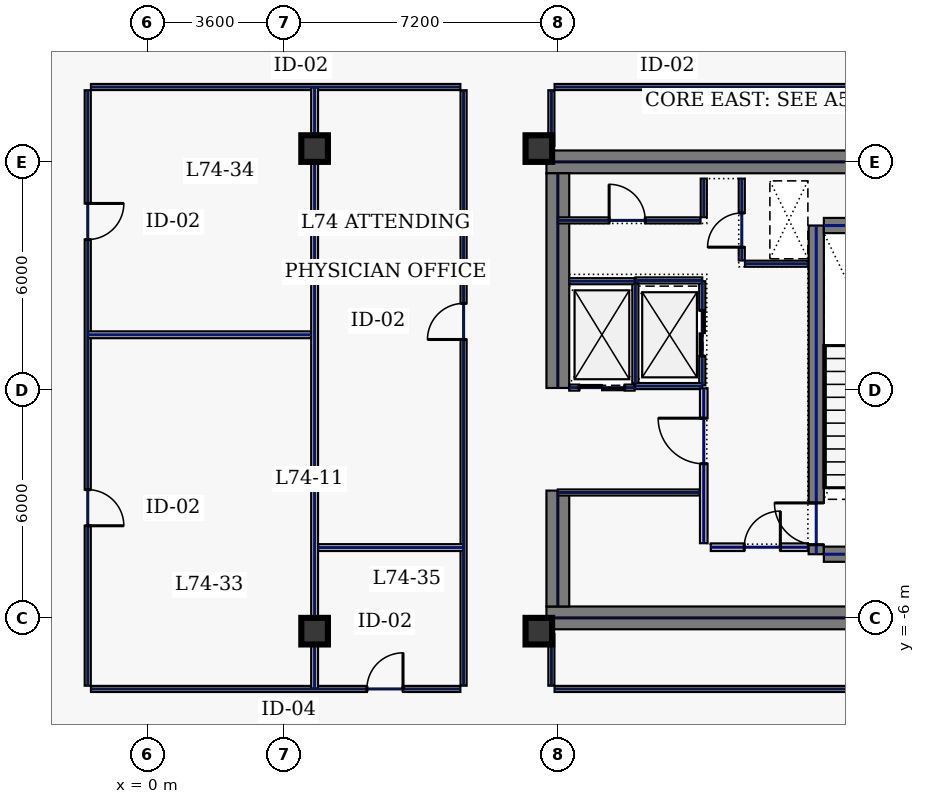
"""IFC4 building model, lengths in metres.
Left out: names, types, materials, properties, quantities, classifications, styles, units other than length and angle.
Written with IfcOpenShell. Run it as: python <this file> out.ifc"""

import sys

from ifc_helpers import new_model, si_unit, direction, frame, frame_2d, origin, origin_2d, place, context, subcontext, project, spatial, rectangle, hollow_rectangle, extrude, element, fill, save


model = new_model("IFC4")
c1 = context("Model", 3, precision=1e-05, world=origin(), true_north=direction((0.0, 1.0)))
c2 = subcontext(c1, "Body", "Model", "MODEL_VIEW")
j1 = project(units=[si_unit("LENGTHUNIT", "METRE"), si_unit("PLANEANGLEUNIT", "RADIAN")], contexts=[c1])
p1 = place(None, origin())
s1 = spatial("IfcSite", under=j1, at=p1, CompositionType="ELEMENT")
p2 = place(p1, origin())
s2 = spatial("IfcBuilding", under=s1, at=p2, CompositionType="ELEMENT")
p3 = place(p2, frame((0.0, 0.0, 317.0)))
s3 = spatial("IfcBuildingStorey", under=s2, at=p3, CompositionType="ELEMENT", Elevation=317.0)
for number, where, z_axis, x_axis in (
    (1, (10.5, 6.0, 0.0), (0.0, 0.0, 1.0), (1.0, 0.0, 0.0)),
    (2, (10.5, -6.0, 0.0), (0.0, 0.0, 1.0), (1.0, 0.0, 0.0)),
):
    element("IfcWall", number, at=place(p3, frame(where, z_axis=z_axis, x_axis=x_axis)), inside=s3, PredefinedType="SHEAR", context=c2, shape_type="SweptSolid", body=[
        extrude(rectangle(XDim=11.5, YDim=0.6, at=frame_2d((5.75, 0.0))), origin(), (0.0, 0.0, 1.0), 3.74),
    ])
p4 = place(p3, frame((10.8, -5.7, 0.0), z_axis=(0.0, 0.0, 1.0), x_axis=(0.0, 1.0, 0.0)))
e3 = element("IfcWall", 3, at=p4, inside=s3, PredefinedType="SHEAR", context=c2, shape_type="SweptSolid", body=[
    extrude(rectangle(XDim=3.05, YDim=0.6, at=frame_2d((1.525, 0.0))), origin(), (0.0, 0.0, 1.0), 3.74),
])
p5 = place(p3, frame((10.8, 0.05, 0.0), z_axis=(0.0, 0.0, 1.0), x_axis=(0.0, 1.0, 0.0)))
e4 = element("IfcWall", 4, at=p5, inside=s3, PredefinedType="SHEAR", context=c2, shape_type="SweptSolid", body=[
    extrude(rectangle(XDim=5.65, YDim=0.6, at=frame_2d((2.825, 0.0))), origin(), (0.0, 0.0, 1.0), 3.74),
])
p6 = place(p3, frame((17.6, -4.325, 0.0), z_axis=(0.0, 0.0, 1.0), x_axis=(0.0, 1.0, 0.0)))
e5 = element("IfcWall", 5, at=p6, inside=s3, PredefinedType="SHEAR", context=c2, shape_type="SweptSolid", body=[
    extrude(rectangle(XDim=8.65, YDim=0.4, at=frame_2d((4.325, 0.0))), origin(), (0.0, 0.0, 1.0), 3.74),
])
p7 = place(p6, frame((0.25, 0.0, 0.0)))
e6 = element("IfcOpeningElement", 6, at=p7, cuts=e5, PredefinedType="OPENING", context=c2, shape_type="SweptSolid", body=[
    extrude(rectangle(XDim=1.1, YDim=2.2, at=frame_2d((0.55, 1.1))), frame((0.0, 0.21, 0.0), z_axis=(0.0, -1.0, 0.0), x_axis=(1.0, 0.0, 0.0)), (0.0, 0.0, 1.0), 0.42),
])
for number, where, z_axis, x_axis in (
    (7, (17.8, -4.325, 0.0), (0.0, 0.0, 1.0), (1.0, 0.0, 0.0)),
    (8, (17.8, 4.325, 0.0), (0.0, 0.0, 1.0), (1.0, 0.0, 0.0)),
):
    element("IfcWall", number, at=place(p3, frame(where, z_axis=z_axis, x_axis=x_axis)), inside=s3, PredefinedType="SHEAR", context=c2, shape_type="SweptSolid", body=[
        extrude(rectangle(XDim=3.4, YDim=0.4, at=frame_2d((1.7, 0.0))), origin(), (0.0, 0.0, 1.0), 3.74),
    ])
for number, where, z_axis, x_axis in (
    (9, (10.3, -6.35, 0.0), (0.0, 0.0, 1.0), (1.0, 0.0, 0.0)),
    (10, (10.3, 6.35, 0.0), (0.0, 0.0, 1.0), (1.0, 0.0, 0.0)),
    (11, (4.4, -6.35, 0.0), (0.0, 0.0, 1.0), (1.0, 0.0, 0.0)),
    (12, (4.4, 6.35, 0.0), (0.0, 0.0, 1.0), (1.0, 0.0, 0.0)),
):
    element("IfcColumn", number, at=place(p3, frame(where, z_axis=z_axis, x_axis=x_axis)), inside=s3, PredefinedType="COLUMN", context=c2, shape_type="SweptSolid", body=[
        extrude(hollow_rectangle(XDim=0.7, YDim=0.7, WallThickness=0.032, at=origin_2d()), origin(), (0.0, 0.0, 1.0), 3.74),
    ])
p8 = place(p3, frame((14.6, 0.12, 0.0), z_axis=(0.0, 0.0, 1.0), x_axis=(0.0, 1.0, 0.0)))
e13 = element("IfcWall", 13, at=p8, inside=s3, PredefinedType="PARTITIONING", context=c2, shape_type="SweptSolid", body=[
    extrude(rectangle(XDim=2.74, YDim=0.16, at=frame_2d((1.37, 0.0))), origin(), (0.0, 0.0, 1.0), 3.74),
])
p9 = place(p8, frame((0.77, 0.0, 0.0)))
e14 = element("IfcOpeningElement", 14, at=p9, cuts=e13, PredefinedType="OPENING", context=c2, shape_type="SweptSolid", body=[
    extrude(rectangle(XDim=1.2, YDim=2.2, at=frame_2d((0.6, 1.1))), frame((0.0, 0.09, 0.0), z_axis=(0.0, -1.0, 0.0), x_axis=(1.0, 0.0, 0.0)), (0.0, 0.0, 1.0), 0.18),
])
for number, where, z_axis, x_axis in (
    (15, (12.84, 0.1, 0.0), (0.0, 0.0, 1.0), (1.0, 0.0, 0.0)),
    (16, (12.84, 2.88, 0.0), (0.0, 0.0, 1.0), (1.0, 0.0, 0.0)),
):
    element("IfcWall", number, at=place(p3, frame(where, z_axis=z_axis, x_axis=x_axis)), inside=s3, PredefinedType="PARTITIONING", context=c2, shape_type="SweptSolid", body=[
        extrude(rectangle(XDim=1.76, YDim=0.16, at=frame_2d((0.88, 0.0))), origin(), (0.0, 0.0, 1.0), 3.74),
    ])
p10 = place(p3, frame((12.84, 0.18, 0.0), z_axis=(0.0, 0.0, 1.0), x_axis=(0.0, 1.0, 0.0)))
e17 = element("IfcWall", 17, at=p10, inside=s3, PredefinedType="PARTITIONING", context=c2, shape_type="SweptSolid", body=[
    extrude(rectangle(XDim=2.62, YDim=0.16, at=frame_2d((1.31, 0.0))), origin(), (0.0, 0.0, 1.0), 3.74),
])
p11 = place(p3, frame((11.1, 0.06, 0.0), z_axis=(0.0, 0.0, 1.0), x_axis=(1.0, 0.0, 0.0)))
e18 = element("IfcWall", 18, at=p11, inside=s3, PredefinedType="PARTITIONING", context=c2, shape_type="SweptSolid", body=[
    extrude(rectangle(XDim=1.72, YDim=0.16, at=frame_2d((0.86, 0.0))), origin(), (0.0, 0.0, 1.0), 3.74),
])
p12 = place(p11, frame((0.26, 0.0, 0.0)))
e19 = element("IfcOpeningElement", 19, at=p12, cuts=e18, PredefinedType="OPENING", context=c2, shape_type="SweptSolid", body=[
    extrude(rectangle(XDim=1.2, YDim=2.2, at=frame_2d((0.6, 1.1))), frame((0.0, 0.09, 0.0), z_axis=(0.0, -1.0, 0.0), x_axis=(1.0, 0.0, 0.0)), (0.0, 0.0, 1.0), 0.18),
])
p13 = place(p3, frame((11.1, 2.86, 0.0), z_axis=(0.0, 0.0, 1.0), x_axis=(1.0, 0.0, 0.0)))
e20 = element("IfcWall", 20, at=p13, inside=s3, PredefinedType="PARTITIONING", context=c2, shape_type="SweptSolid", body=[
    extrude(rectangle(XDim=1.72, YDim=0.16, at=frame_2d((0.86, 0.0))), origin(), (0.0, 0.0, 1.0), 3.74),
])
p14 = place(p3, frame((15.64, 3.405, 0.0), z_axis=(0.0, 0.0, 1.0), x_axis=(0.0, 1.0, 0.0)))
e21 = element("IfcWall", 21, at=p14, inside=s3, PredefinedType="PARTITIONING", context=c2, shape_type="SweptSolid", body=[
    extrude(rectangle(XDim=2.155, YDim=0.16, at=frame_2d((1.078, 0.0))), origin(), (0.0, 0.0, 1.0), 3.74),
])
p15 = place(p14, frame((0.35, 0.0, 0.0)))
e22 = element("IfcOpeningElement", 22, at=p15, cuts=e21, PredefinedType="OPENING", context=c2, shape_type="SweptSolid", body=[
    extrude(rectangle(XDim=0.9, YDim=2.2, at=frame_2d((0.45, 1.1))), frame((0.0, 0.09, 0.0), z_axis=(0.0, -1.0, 0.0), x_axis=(1.0, 0.0, 0.0)), (0.0, 0.0, 1.0), 0.18),
])
p16 = place(p3, frame((15.725, 3.32, 0.0), z_axis=(0.0, 0.0, 1.0), x_axis=(1.0, 0.0, 0.0)))
e23 = element("IfcWall", 23, at=p16, inside=s3, PredefinedType="PARTITIONING", context=c2, shape_type="SweptSolid", body=[
    extrude(rectangle(XDim=1.655, YDim=0.16, at=frame_2d((0.827, 0.0))), origin(), (0.0, 0.0, 1.0), 3.74),
])
p17 = place(p3, frame((14.825, -4.14, 0.0), z_axis=(0.0, 0.0, 1.0), x_axis=(1.0, 0.0, 0.0)))
e24 = element("IfcWall", 24, at=p17, inside=s3, PredefinedType="SOLIDWALL", context=c2, shape_type="SweptSolid", body=[
    extrude(rectangle(XDim=2.555, YDim=0.2, at=frame_2d((1.277, 0.0))), origin(), (0.0, 0.0, 1.0), 3.74),
])
p18 = place(p17, frame((0.88, 0.0, 0.0)))
e25 = element("IfcOpeningElement", 25, at=p18, cuts=e24, PredefinedType="OPENING", context=c2, shape_type="SweptSolid", body=[
    extrude(rectangle(XDim=0.95, YDim=2.2, at=frame_2d((0.475, 1.1))), frame((0.0, 0.11, 0.0), z_axis=(0.0, -1.0, 0.0), x_axis=(1.0, 0.0, 0.0)), (0.0, 0.0, 1.0), 0.22),
])
p19 = place(p3, frame((10.8, -2.7, 0.0), z_axis=(0.0, 0.0, 1.0), x_axis=(1.0, 0.0, 0.0)))
e26 = element("IfcWall", 26, at=p19, inside=s3, PredefinedType="PARTITIONING", context=c2, shape_type="SweptSolid", body=[
    extrude(rectangle(XDim=3.735, YDim=0.16, at=frame_2d((1.867, 0.0))), origin(), (0.0, 0.0, 1.0), 3.74),
])
p20 = place(p3, frame((10.8, 4.46, 0.0), z_axis=(0.0, 0.0, 1.0), x_axis=(1.0, 0.0, 0.0)))
e27 = element("IfcWall", 27, at=p20, inside=s3, PredefinedType="PARTITIONING", context=c2, shape_type="SweptSolid", body=[
    extrude(rectangle(XDim=3.755, YDim=0.16, at=frame_2d((1.877, 0.0))), origin(), (0.0, 0.0, 1.0), 3.74),
])
p21 = place(p20, frame((1.35, 0.0, 0.0)))
e28 = element("IfcOpeningElement", 28, at=p21, cuts=e27, PredefinedType="OPENING", context=c2, shape_type="SweptSolid", body=[
    extrude(rectangle(XDim=0.95, YDim=2.2, at=frame_2d((0.475, 1.1))), frame((0.0, 0.09, 0.0), z_axis=(0.0, -1.0, 0.0), x_axis=(1.0, 0.0, 0.0)), (0.0, 0.0, 1.0), 0.18),
])
p22 = place(p3, frame((14.64, 4.545, 0.0), z_axis=(0.0, 0.0, 1.0), x_axis=(0.0, 1.0, 0.0)))
e29 = element("IfcWall", 29, at=p22, inside=s3, PredefinedType="PARTITIONING", context=c2, shape_type="SweptSolid", body=[
    extrude(rectangle(XDim=1.015, YDim=0.16, at=frame_2d((0.508, 0.0))), origin(), (0.0, 0.0, 1.0), 3.74),
])
p23 = place(p3, frame((14.64, -4.035, 0.0), z_axis=(0.0, 0.0, 1.0), x_axis=(0.0, 1.0, 0.0)))
e30 = element("IfcWall", 30, at=p23, inside=s3, PredefinedType="SOLIDWALL", context=c2, shape_type="SweptSolid", body=[
    extrude(rectangle(XDim=4.075, YDim=0.2, at=frame_2d((2.038, 0.0))), origin(), (0.0, 0.0, 1.0), 3.74),
])
p24 = place(p23, frame((2.09, 0.0, 0.0)))
e31 = element("IfcOpeningElement", 31, at=p24, cuts=e30, PredefinedType="OPENING", context=c2, shape_type="SweptSolid", body=[
    extrude(rectangle(XDim=1.2, YDim=2.2, at=frame_2d((0.6, 1.1))), frame((0.0, 0.11, 0.0), z_axis=(0.0, -1.0, 0.0), x_axis=(1.0, 0.0, 0.0)), (0.0, 0.0, 1.0), 0.22),
])
p25 = place(p3, frame((21.915, 7.97, 0.0), z_axis=(0.0, 0.0, 1.0), x_axis=(-1.0, 0.0, 0.0)))
e32 = element("IfcWall", 32, at=p25, inside=s3, PredefinedType="PARTITIONING", context=c2, shape_type="SweptSolid", body=[
    extrude(rectangle(XDim=11.2, YDim=0.16, at=frame_2d((5.6, 0.0))), origin(), (0.0, 0.0, 1.0), 3.74),
])
p26 = place(p3, frame((10.63, 7.885, 0.0), z_axis=(0.0, 0.0, 1.0), x_axis=(0.0, -1.0, 0.0)))
e33 = element("IfcWall", 33, at=p26, inside=s3, PredefinedType="PARTITIONING", context=c2, shape_type="SweptSolid", body=[
    extrude(rectangle(XDim=1.465, YDim=0.16, at=frame_2d((0.732, 0.0))), origin(), (0.0, 0.0, 1.0), 3.74),
])
p27 = place(p3, frame((10.63, -6.42, 0.0), z_axis=(0.0, 0.0, 1.0), x_axis=(0.0, -1.0, 0.0)))
e34 = element("IfcWall", 34, at=p27, inside=s3, PredefinedType="PARTITIONING", context=c2, shape_type="SweptSolid", body=[
    extrude(rectangle(XDim=1.365, YDim=0.16, at=frame_2d((0.683, 0.0))), origin(), (0.0, 0.0, 1.0), 3.74),
])
p28 = place(p3, frame((10.715, -7.87, 0.0), z_axis=(0.0, 0.0, 1.0), x_axis=(1.0, 0.0, 0.0)))
e35 = element("IfcWall", 35, at=p28, inside=s3, PredefinedType="PARTITIONING", context=c2, shape_type="SweptSolid", body=[
    extrude(rectangle(XDim=11.2, YDim=0.16, at=frame_2d((5.6, 0.0))), origin(), (0.0, 0.0, 1.0), 3.74),
])
p29 = place(p3, frame((8.235, 7.97, 0.0), z_axis=(0.0, 0.0, 1.0), x_axis=(-1.0, 0.0, 0.0)))
e36 = element("IfcWall", 36, at=p29, inside=s3, PredefinedType="PARTITIONING", context=c2, shape_type="SweptSolid", body=[
    extrude(rectangle(XDim=9.72, YDim=0.16, at=frame_2d((4.86, 0.0))), origin(), (0.0, 0.0, 1.0), 3.74),
])
p30 = place(p3, frame((-1.57, 7.885, 0.0), z_axis=(0.0, 0.0, 1.0), x_axis=(0.0, -1.0, 0.0)))
e37 = element("IfcWall", 37, at=p30, inside=s3, PredefinedType="PARTITIONING", context=c2, shape_type="SweptSolid", body=[
    extrude(rectangle(XDim=15.67, YDim=0.16, at=frame_2d((7.835, 0.0))), origin(), (0.0, 0.0, 1.0), 3.74),
])
p31 = place(p30, frame((10.511, 0.0, 0.0)))
e38 = element("IfcOpeningElement", 38, at=p31, cuts=e37, PredefinedType="OPENING", context=c2, shape_type="SweptSolid", body=[
    extrude(rectangle(XDim=0.95, YDim=2.2, at=frame_2d((0.475, 1.1))), frame((0.0, 0.09, 0.0), z_axis=(0.0, -1.0, 0.0), x_axis=(1.0, 0.0, 0.0)), (0.0, 0.0, 1.0), 0.18),
])
p32 = place(p30, frame((2.979, 0.0, 0.0)))
e39 = element("IfcOpeningElement", 39, at=p32, cuts=e37, PredefinedType="OPENING", context=c2, shape_type="SweptSolid", body=[
    extrude(rectangle(XDim=0.95, YDim=2.2, at=frame_2d((0.475, 1.1))), frame((0.0, 0.09, 0.0), z_axis=(0.0, -1.0, 0.0), x_axis=(1.0, 0.0, 0.0)), (0.0, 0.0, 1.0), 0.18),
])
p33 = place(p3, frame((-1.485, -7.87, 0.0), z_axis=(0.0, 0.0, 1.0), x_axis=(1.0, 0.0, 0.0)))
e40 = element("IfcWall", 40, at=p33, inside=s3, PredefinedType="PARTITIONING", context=c2, shape_type="SweptSolid", body=[
    extrude(rectangle(XDim=9.72, YDim=0.16, at=frame_2d((4.86, 0.0))), origin(), (0.0, 0.0, 1.0), 3.74),
])
p34 = place(p33, frame((7.261, 0.0, 0.0)))
e41 = element("IfcOpeningElement", 41, at=p34, cuts=e40, PredefinedType="OPENING", context=c2, shape_type="SweptSolid", body=[
    extrude(rectangle(XDim=0.95, YDim=2.2, at=frame_2d((0.475, 1.1))), frame((0.0, 0.09, 0.0), z_axis=(0.0, -1.0, 0.0), x_axis=(1.0, 0.0, 0.0)), (0.0, 0.0, 1.0), 0.18),
])
p35 = place(p3, frame((8.32, -7.785, 0.0), z_axis=(0.0, 0.0, 1.0), x_axis=(0.0, 1.0, 0.0)))
e42 = element("IfcWall", 42, at=p35, inside=s3, PredefinedType="PARTITIONING", context=c2, shape_type="SweptSolid", body=[
    extrude(rectangle(XDim=15.67, YDim=0.16, at=frame_2d((7.835, 0.0))), origin(), (0.0, 0.0, 1.0), 3.74),
])
p36 = place(p35, frame((9.111, 0.0, 0.0)))
e43 = element("IfcOpeningElement", 43, at=p36, cuts=e42, PredefinedType="OPENING", context=c2, shape_type="SweptSolid", body=[
    extrude(rectangle(XDim=0.95, YDim=2.2, at=frame_2d((0.475, 1.1))), frame((0.0, 0.09, 0.0), z_axis=(0.0, -1.0, 0.0), x_axis=(1.0, 0.0, 0.0)), (0.0, 0.0, 1.0), 0.18),
])
p37 = place(p3, frame((4.4, -7.865, 0.0), z_axis=(0.0, 0.0, 1.0), x_axis=(0.0, 1.0, 0.0)))
e44 = element("IfcWall", 44, at=p37, inside=s3, PredefinedType="PARTITIONING", context=c2, shape_type="SweptSolid", body=[
    extrude(rectangle(XDim=15.83, YDim=0.18, at=frame_2d((7.915, 0.0))), origin(), (0.0, 0.0, 1.0), 3.035),
])
p38 = place(p3, frame((-1.565, 1.45, 0.0), z_axis=(0.0, 0.0, 1.0), x_axis=(1.0, 0.0, 0.0)))
e45 = element("IfcWall", 45, at=p38, inside=s3, PredefinedType="PARTITIONING", context=c2, shape_type="SweptSolid", body=[
    extrude(rectangle(XDim=5.87, YDim=0.18, at=frame_2d((2.935, 0.0))), origin(), (0.0, 0.0, 1.0), 3.74),
])
p39 = place(p3, frame((4.495, -4.15, 0.0), z_axis=(0.0, 0.0, 1.0), x_axis=(1.0, 0.0, 0.0)))
e46 = element("IfcWall", 46, at=p39, inside=s3, PredefinedType="PARTITIONING", context=c2, shape_type="SweptSolid", body=[
    extrude(rectangle(XDim=3.82, YDim=0.18, at=frame_2d((1.91, 0.0))), origin(), (0.0, 0.0, 1.0), 3.74),
])
p40 = place(p7, origin())
e47 = element("IfcDoor", 47, at=p40, inside=s3, OperationType="SINGLE_SWING_RIGHT", PredefinedType="DOOR", context=c2, shape_type="SweptSolid", body=[
    extrude(rectangle(XDim=1.1, YDim=2.2, at=frame_2d((0.55, 1.1))), frame((0.0, 0.025, 0.0), z_axis=(0.0, -1.0, 0.0), x_axis=(1.0, 0.0, 0.0)), (0.0, 0.0, 1.0), 0.05),
])
fill(e6, e47)
p41 = place(p9, origin())
e48 = element("IfcDoor", 48, at=p41, inside=s3, OperationType="SLIDING_TO_LEFT", PredefinedType="DOOR", context=c2, shape_type="SweptSolid", body=[
    extrude(rectangle(XDim=1.2, YDim=2.2, at=frame_2d((0.6, 1.1))), frame((0.0, 0.025, 0.0), z_axis=(0.0, -1.0, 0.0), x_axis=(1.0, 0.0, 0.0)), (0.0, 0.0, 1.0), 0.05),
])
fill(e14, e48)
p42 = place(p12, origin())
e49 = element("IfcDoor", 49, at=p42, inside=s3, OperationType="SLIDING_TO_LEFT", PredefinedType="DOOR", context=c2, shape_type="SweptSolid", body=[
    extrude(rectangle(XDim=1.2, YDim=2.2, at=frame_2d((0.6, 1.1))), frame((0.0, 0.025, 0.0), z_axis=(0.0, -1.0, 0.0), x_axis=(1.0, 0.0, 0.0)), (0.0, 0.0, 1.0), 0.05),
])
fill(e19, e49)
p43 = place(p15, origin())
e50 = element("IfcDoor", 50, at=p43, inside=s3, OperationType="SINGLE_SWING_LEFT", PredefinedType="DOOR", context=c2, shape_type="SweptSolid", body=[
    extrude(rectangle(XDim=0.9, YDim=2.2, at=frame_2d((0.45, 1.1))), frame((0.0, 0.025, 0.0), z_axis=(0.0, -1.0, 0.0), x_axis=(1.0, 0.0, 0.0)), (0.0, 0.0, 1.0), 0.05),
])
fill(e22, e50)
p44 = place(p18, origin())
e51 = element("IfcDoor", 51, at=p44, inside=s3, OperationType="SINGLE_SWING_RIGHT", PredefinedType="DOOR", context=c2, shape_type="SweptSolid", body=[
    extrude(rectangle(XDim=0.95, YDim=2.2, at=frame_2d((0.475, 1.1))), frame((0.0, 0.025, 0.0), z_axis=(0.0, -1.0, 0.0), x_axis=(1.0, 0.0, 0.0)), (0.0, 0.0, 1.0), 0.05),
])
fill(e25, e51)
p45 = place(p21, origin())
e52 = element("IfcDoor", 52, at=p45, inside=s3, OperationType="SINGLE_SWING_LEFT", PredefinedType="DOOR", context=c2, shape_type="SweptSolid", body=[
    extrude(rectangle(XDim=0.95, YDim=2.2, at=frame_2d((0.475, 1.1))), frame((0.0, 0.025, 0.0), z_axis=(0.0, -1.0, 0.0), x_axis=(1.0, 0.0, 0.0)), (0.0, 0.0, 1.0), 0.05),
])
fill(e28, e52)
p46 = place(p24, origin())
e53 = element("IfcDoor", 53, at=p46, inside=s3, OperationType="SINGLE_SWING_RIGHT", PredefinedType="DOOR", context=c2, shape_type="SweptSolid", body=[
    extrude(rectangle(XDim=1.2, YDim=2.2, at=frame_2d((0.6, 1.1))), frame((0.0, 0.025, 0.0), z_axis=(0.0, -1.0, 0.0), x_axis=(1.0, 0.0, 0.0)), (0.0, 0.0, 1.0), 0.05),
])
fill(e31, e53)
p47 = place(p31, origin())
e54 = element("IfcDoor", 54, at=p47, inside=s3, OperationType="SINGLE_SWING_RIGHT", PredefinedType="DOOR", context=c2, shape_type="SweptSolid", body=[
    extrude(rectangle(XDim=0.95, YDim=2.2, at=frame_2d((0.475, 1.1))), frame((0.0, 0.025, 0.0), z_axis=(0.0, -1.0, 0.0), x_axis=(1.0, 0.0, 0.0)), (0.0, 0.0, 1.0), 0.05),
])
fill(e38, e54)
p48 = place(p32, origin())
e55 = element("IfcDoor", 55, at=p48, inside=s3, OperationType="SINGLE_SWING_LEFT", PredefinedType="DOOR", context=c2, shape_type="SweptSolid", body=[
    extrude(rectangle(XDim=0.95, YDim=2.2, at=frame_2d((0.475, 1.1))), frame((0.0, 0.025, 0.0), z_axis=(0.0, -1.0, 0.0), x_axis=(1.0, 0.0, 0.0)), (0.0, 0.0, 1.0), 0.05),
])
fill(e39, e55)
p49 = place(p34, origin())
e56 = element("IfcDoor", 56, at=p49, inside=s3, OperationType="SINGLE_SWING_RIGHT", PredefinedType="DOOR", context=c2, shape_type="SweptSolid", body=[
    extrude(rectangle(XDim=0.95, YDim=2.2, at=frame_2d((0.475, 1.1))), frame((0.0, 0.025, 0.0), z_axis=(0.0, -1.0, 0.0), x_axis=(1.0, 0.0, 0.0)), (0.0, 0.0, 1.0), 0.05),
])
fill(e41, e56)
p50 = place(p36, origin())
e57 = element("IfcDoor", 57, at=p50, inside=s3, OperationType="SINGLE_SWING_LEFT", PredefinedType="DOOR", context=c2, shape_type="SweptSolid", body=[
    extrude(rectangle(XDim=0.95, YDim=2.2, at=frame_2d((0.475, 1.1))), frame((0.0, 0.025, 0.0), z_axis=(0.0, -1.0, 0.0), x_axis=(1.0, 0.0, 0.0)), (0.0, 0.0, 1.0), 0.05),
])
fill(e43, e57)
save(model, sys.argv[1])
